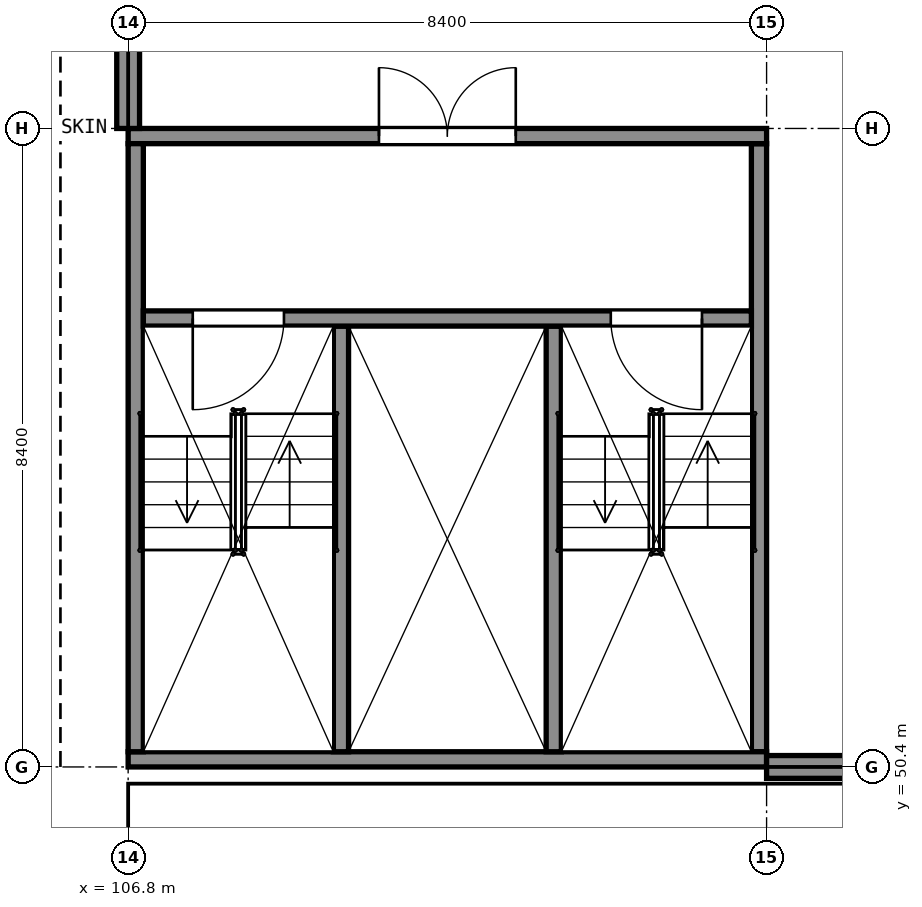
"""IFC4 building model, lengths in metres.
Left out: names, types, materials, properties, quantities, classifications, styles, units other than length and angle.
Written with IfcOpenShell. Run it as: python <this file> out.ifc"""

import sys

from ifc_helpers import new_model, si_unit, direction, frame, frame_2d, origin, place, context, subcontext, project, spatial, rectangle, extrude, element, fill, save


model = new_model("IFC4")
c1 = context("Model", 3, precision=1e-05, world=origin(), true_north=direction((0.0, 1.0)))
c2 = subcontext(c1, "Body", "Model", "MODEL_VIEW")
j1 = project(units=[si_unit("LENGTHUNIT", "METRE"), si_unit("PLANEANGLEUNIT", "RADIAN")], contexts=[c1])
p1 = place(None, origin())
s1 = spatial("IfcSite", under=j1, at=p1, CompositionType="ELEMENT")
p2 = place(p1, origin())
s2 = spatial("IfcBuilding", under=s1, at=p2, CompositionType="ELEMENT")
p3 = place(p2, frame((0.0, 0.0, 5.5)))
s3 = spatial("IfcBuildingStorey", under=s2, at=p3, CompositionType="ELEMENT", Elevation=5.5)
p4 = place(p3, frame((106.8, 50.5, 0.0), z_axis=(0.0, 0.0, 1.0), x_axis=(1.0, 0.0, 0.0)))
e1 = element("IfcWall", 1, at=p4, inside=s3, PredefinedType="SHEAR", context=c2, shape_type="SweptSolid", body=[
    extrude(rectangle(XDim=8.4, YDim=0.2, at=frame_2d((4.2, 0.0))), origin(), (0.0, 0.0, 1.0), 5.0),
])
p5 = place(p3, frame((106.8, 58.7, 0.0), z_axis=(0.0, 0.0, 1.0), x_axis=(1.0, 0.0, 0.0)))
e2 = element("IfcWall", 2, at=p5, inside=s3, PredefinedType="SHEAR", context=c2, shape_type="SweptSolid", body=[
    extrude(rectangle(XDim=8.4, YDim=0.2, at=frame_2d((4.2, 0.0))), origin(), (0.0, 0.0, 1.0), 5.0),
])
p6 = place(p5, frame((3.3, 0.0, 0.0)))
e3 = element("IfcOpeningElement", 3, at=p6, cuts=e2, PredefinedType="OPENING", context=c2, shape_type="SweptSolid", body=[
    extrude(rectangle(XDim=1.8, YDim=2.1, at=frame_2d((0.9, 1.05))), frame((0.0, 0.11, 0.0), z_axis=(0.0, -1.0, 0.0), x_axis=(1.0, 0.0, 0.0)), (0.0, 0.0, 1.0), 0.22),
])
for number, where, z_axis, x_axis in (
    (4, (106.9, 50.6, 0.0), (0.0, 0.0, 1.0), (0.0, 1.0, 0.0)),
    (5, (115.1, 50.6, 0.0), (0.0, 0.0, 1.0), (0.0, 1.0, 0.0)),
):
    element("IfcWall", number, at=place(p3, frame(where, z_axis=z_axis, x_axis=x_axis)), inside=s3, PredefinedType="SHEAR", context=c2, shape_type="SweptSolid", body=[
        extrude(rectangle(XDim=8.0, YDim=0.2, at=frame_2d((4.0, 0.0))), origin(), (0.0, 0.0, 1.0), 5.0),
    ])
p7 = place(p3, frame((107.0, 56.3, 0.0), z_axis=(0.0, 0.0, 1.0), x_axis=(1.0, 0.0, 0.0)))
e6 = element("IfcWall", 6, at=p7, inside=s3, PredefinedType="SHEAR", context=c2, shape_type="SweptSolid", body=[
    extrude(rectangle(XDim=8.0, YDim=0.2, at=frame_2d((4.0, 0.0))), origin(), (0.0, 0.0, 1.0), 5.0),
])
p8 = place(p7, frame((0.65, 0.0, 0.0)))
e7 = element("IfcOpeningElement", 7, at=p8, cuts=e6, PredefinedType="OPENING", context=c2, shape_type="SweptSolid", body=[
    extrude(rectangle(XDim=1.2, YDim=2.1, at=frame_2d((0.6, 1.05))), frame((0.0, 0.11, 0.0), z_axis=(0.0, -1.0, 0.0), x_axis=(1.0, 0.0, 0.0)), (0.0, 0.0, 1.0), 0.22),
])
p9 = place(p7, frame((6.15, 0.0, 0.0)))
e8 = element("IfcOpeningElement", 8, at=p9, cuts=e6, PredefinedType="OPENING", context=c2, shape_type="SweptSolid", body=[
    extrude(rectangle(XDim=1.2, YDim=2.1, at=frame_2d((0.6, 1.05))), frame((0.0, 0.11, 0.0), z_axis=(0.0, -1.0, 0.0), x_axis=(1.0, 0.0, 0.0)), (0.0, 0.0, 1.0), 0.22),
])
for number, where, z_axis, x_axis in (
    (9, (109.6, 50.6, 0.0), (0.0, 0.0, 1.0), (0.0, 1.0, 0.0)),
    (10, (112.4, 50.6, 0.0), (0.0, 0.0, 1.0), (0.0, 1.0, 0.0)),
):
    element("IfcWall", number, at=place(p3, frame(where, z_axis=z_axis, x_axis=x_axis)), inside=s3, PredefinedType="SHEAR", context=c2, shape_type="SweptSolid", body=[
        extrude(rectangle(XDim=5.6, YDim=0.2, at=frame_2d((2.8, 0.0))), origin(), (0.0, 0.0, 1.0), 5.0),
    ])
p10 = place(p3, frame((115.2, 50.4, 0.0), z_axis=(0.0, 0.0, 1.0), x_axis=(1.0, 0.0, 0.0)))
e11 = element("IfcWall", 11, at=p10, inside=s3, PredefinedType="SOLIDWALL", context=c2, shape_type="SweptSolid", body=[
    extrude(rectangle(XDim=8.0, YDim=0.3, at=frame_2d((4.0, 0.0))), origin(), (0.0, 0.0, 1.0), 3.94),
])
p11 = place(p3, frame((106.8, 58.8, 0.0), z_axis=(0.0, 0.0, 1.0), x_axis=(0.0, 1.0, 0.0)))
e12 = element("IfcWall", 12, at=p11, inside=s3, PredefinedType="SOLIDWALL", context=c2, shape_type="SweptSolid", body=[
    extrude(rectangle(XDim=8.4, YDim=0.3, at=frame_2d((4.2, 0.0))), origin(), (0.0, 0.0, 1.0), 3.94),
])
p12 = place(p6, origin())
e13 = element("IfcDoor", 13, at=p12, inside=s3, OperationType="DOUBLE_DOOR_SINGLE_SWING", PredefinedType="DOOR", context=c2, shape_type="SweptSolid", body=[
    extrude(rectangle(XDim=1.8, YDim=2.1, at=frame_2d((0.9, 1.05))), frame((0.0, 0.025, 0.0), z_axis=(0.0, -1.0, 0.0), x_axis=(1.0, 0.0, 0.0)), (0.0, 0.0, 1.0), 0.05),
])
fill(e3, e13)
p13 = place(p8, origin())
e14 = element("IfcDoor", 14, at=p13, inside=s3, OperationType="SINGLE_SWING_LEFT", PredefinedType="DOOR", context=c2, shape_type="SweptSolid", body=[
    extrude(rectangle(XDim=1.2, YDim=2.1, at=frame_2d((0.6, 1.05))), frame((0.0, 0.025, 0.0), z_axis=(0.0, -1.0, 0.0), x_axis=(1.0, 0.0, 0.0)), (0.0, 0.0, 1.0), 0.05),
])
fill(e7, e14)
p14 = place(p9, origin())
e15 = element("IfcDoor", 15, at=p14, inside=s3, OperationType="SINGLE_SWING_RIGHT", PredefinedType="DOOR", context=c2, shape_type="SweptSolid", body=[
    extrude(rectangle(XDim=1.2, YDim=2.1, at=frame_2d((0.6, 1.05))), frame((0.0, 0.025, 0.0), z_axis=(0.0, -1.0, 0.0), x_axis=(1.0, 0.0, 0.0)), (0.0, 0.0, 1.0), 0.05),
])
fill(e8, e15)
save(model, sys.argv[1])
